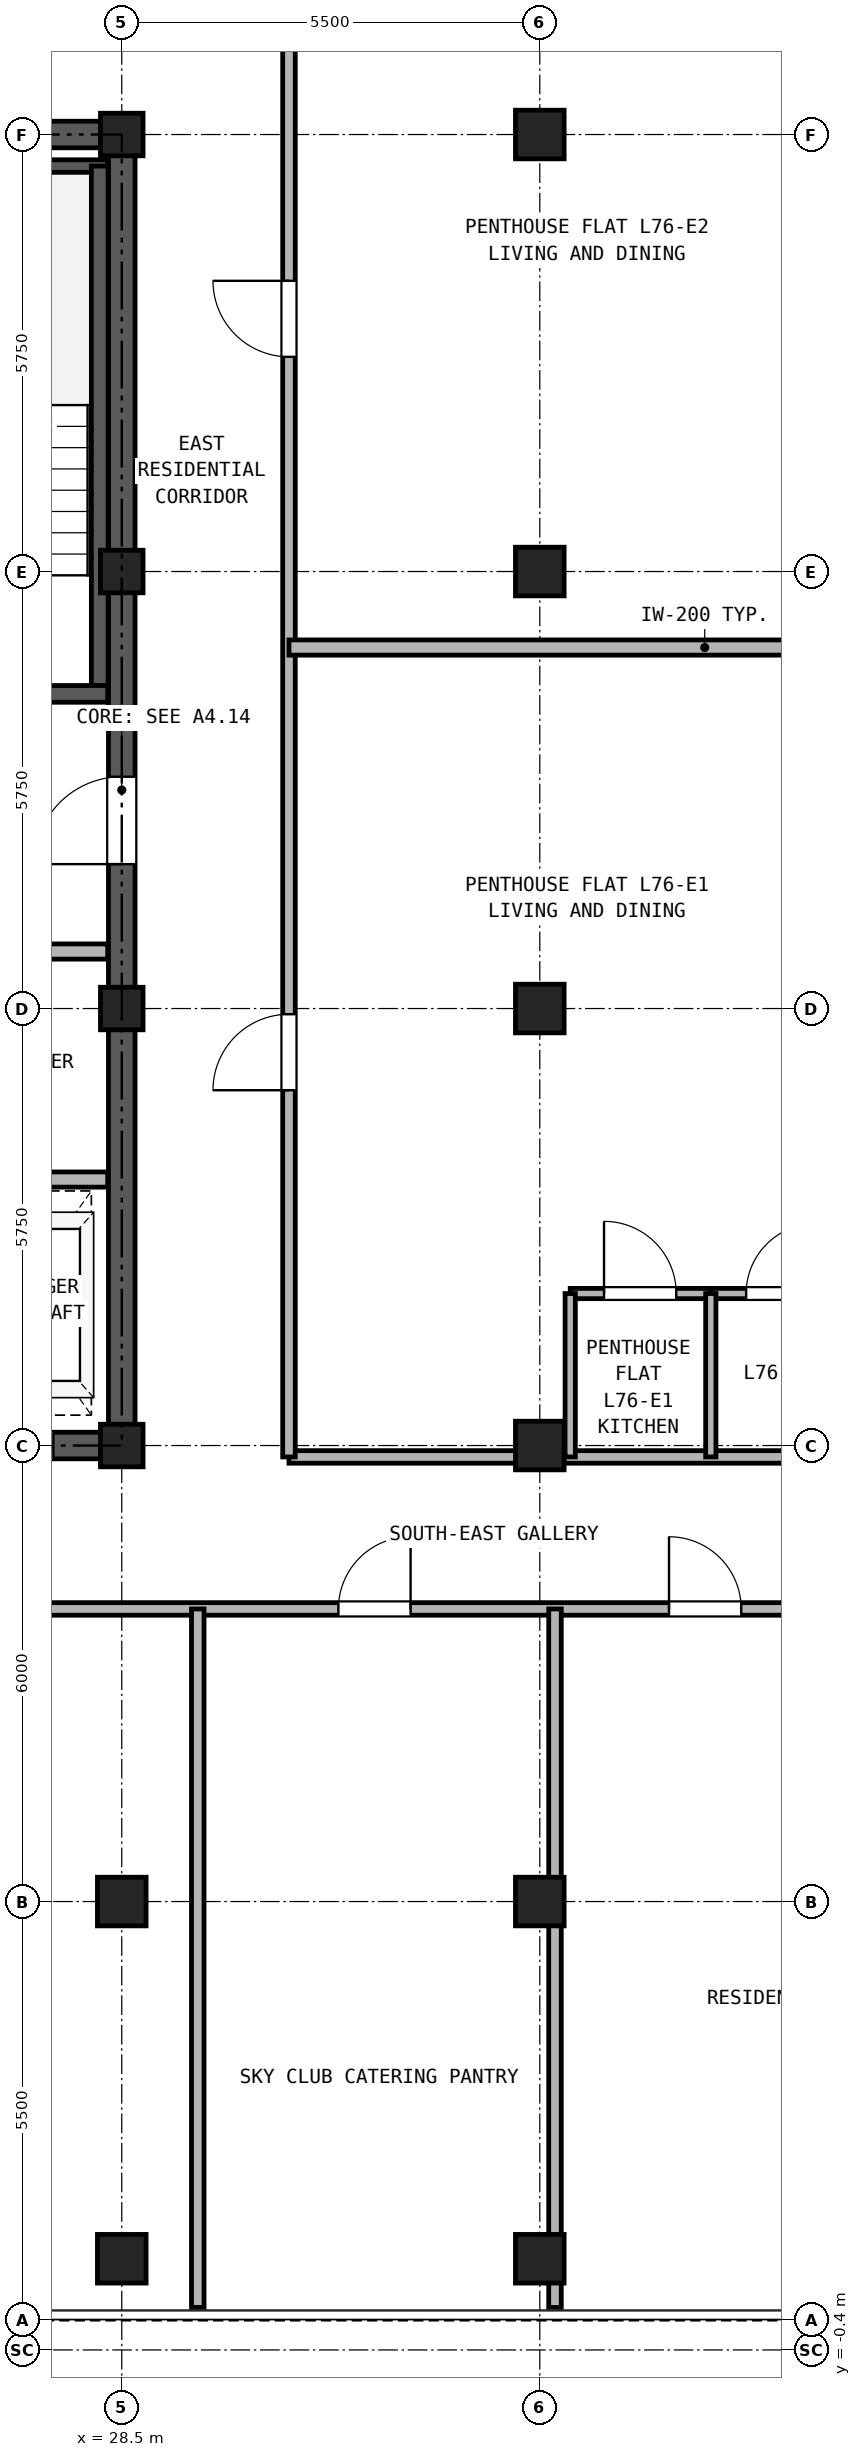
"""IFC4 building model, lengths in metres.
Left out: names, types, materials, properties, quantities, classifications, styles, units other than length and angle.
Written with IfcOpenShell. Run it as: python <this file> out.ifc"""

import sys

from ifc_helpers import new_model, si_unit, direction, frame, frame_2d, origin, origin_2d, place, context, subcontext, project, spatial, rectangle, hollow_rectangle, extrude, source, transform, mapped, element, fill, save


model = new_model("IFC4")
c1 = context("Model", 3, precision=1e-05, world=origin(), true_north=direction((0.0, 1.0)))
c2 = subcontext(c1, "Body", "Model", "MODEL_VIEW")
j1 = project(units=[si_unit("LENGTHUNIT", "METRE"), si_unit("PLANEANGLEUNIT", "RADIAN")], contexts=[c1])
p1 = place(None, origin())
s1 = spatial("IfcSite", under=j1, at=p1, CompositionType="ELEMENT")
p2 = place(p1, origin())
s2 = spatial("IfcBuilding", under=s1, at=p2, CompositionType="ELEMENT")
p3 = place(p2, frame((0.0, 0.0, 264.9)))
s3 = spatial("IfcBuildingStorey", under=s2, at=p3, CompositionType="ELEMENT", Elevation=264.9)
m1 = source(origin(), c2, "Body", "SweptSolid", [
    extrude(hollow_rectangle(XDim=0.64, YDim=0.64, WallThickness=0.035, at=origin_2d()), origin(), (0.0, 0.0, 1.0), 2.98),
])
for number, where, z_axis, x_axis in (
    (1, (28.5, 0.8, 0.0), (0.0, 0.0, 1.0), (1.0, 0.0, 0.0)),
    (2, (34.0, 0.8, 0.0), (0.0, 0.0, 1.0), (1.0, 0.0, 0.0)),
    (3, (28.5, 5.5, 0.0), (0.0, 0.0, 1.0), (1.0, 0.0, 0.0)),
):
    element("IfcColumn", number, at=place(p3, frame(where, z_axis=z_axis, x_axis=x_axis)), inside=s3, PredefinedType="COLUMN", context=c2, shape_type="MappedRepresentation", body=[
        mapped(m1, transform((0.0, 0.0, 0.0), x_axis=(1.0, 0.0, 0.0), y_axis=(0.0, 1.0, 0.0), z_axis=(0.0, 0.0, 1.0), scale=1.0)),
    ])
m2 = source(origin(), c2, "Body", "SweptSolid", [
    extrude(hollow_rectangle(XDim=0.56, YDim=0.56, WallThickness=0.03, at=origin_2d()), origin(), (0.0, 0.0, 1.0), 2.98),
])
for number, where, z_axis, x_axis in (
    (4, (28.5, 11.5, 0.0), (0.0, 0.0, 1.0), (1.0, 0.0, 0.0)),
    (5, (28.5, 17.25, 0.0), (0.0, 0.0, 1.0), (1.0, 0.0, 0.0)),
    (6, (28.5, 23.0, 0.0), (0.0, 0.0, 1.0), (1.0, 0.0, 0.0)),
    (7, (28.5, 28.75, 0.0), (0.0, 0.0, 1.0), (1.0, 0.0, 0.0)),
):
    element("IfcColumn", number, at=place(p3, frame(where, z_axis=z_axis, x_axis=x_axis)), inside=s3, PredefinedType="COLUMN", context=c2, shape_type="MappedRepresentation", body=[
        mapped(m2, transform((0.0, 0.0, 0.0), x_axis=(1.0, 0.0, 0.0), y_axis=(0.0, 1.0, 0.0), z_axis=(0.0, 0.0, 1.0), scale=1.0)),
    ])
for number, where, z_axis, x_axis in (
    (8, (34.0, 5.5, 0.0), (0.0, 0.0, 1.0), (1.0, 0.0, 0.0)),
    (9, (34.0, 11.5, 0.0), (0.0, 0.0, 1.0), (1.0, 0.0, 0.0)),
    (10, (34.0, 17.25, 0.0), (0.0, 0.0, 1.0), (1.0, 0.0, 0.0)),
    (11, (34.0, 23.0, 0.0), (0.0, 0.0, 1.0), (1.0, 0.0, 0.0)),
    (12, (34.0, 28.75, 0.0), (0.0, 0.0, 1.0), (1.0, 0.0, 0.0)),
):
    element("IfcColumn", number, at=place(p3, frame(where, z_axis=z_axis, x_axis=x_axis)), inside=s3, PredefinedType="COLUMN", context=c2, shape_type="MappedRepresentation", body=[
        mapped(m1, transform((0.0, 0.0, 0.0), x_axis=(1.0, 0.0, 0.0), y_axis=(0.0, 1.0, 0.0), z_axis=(0.0, 0.0, 1.0), scale=1.0)),
    ])
p4 = place(p3, frame((18.325, 11.5, 0.0), z_axis=(0.0, 0.0, 1.0), x_axis=(1.0, 0.0, 0.0)))
e13 = element("IfcWall", 13, at=p4, inside=s3, PredefinedType="SHEAR", context=c2, shape_type="SweptSolid", body=[
    extrude(rectangle(XDim=10.35, YDim=0.35, at=frame_2d((5.175, 0.0))), origin(), (0.0, 0.0, 1.0), 2.98),
])
p5 = place(p4, frame((1.775, 0.0, 0.0)))
e14 = element("IfcOpeningElement", 14, at=p5, cuts=e13, PredefinedType="OPENING", context=c2, shape_type="SweptSolid", body=[
    extrude(rectangle(XDim=0.95, YDim=2.15, at=frame_2d((0.475, 1.075))), frame((0.0, 0.185, 0.0), z_axis=(0.0, -1.0, 0.0), x_axis=(1.0, 0.0, 0.0)), (0.0, 0.0, 1.0), 0.37),
])
p6 = place(p4, frame((5.275, 0.0, 0.0)))
e15 = element("IfcOpeningElement", 15, at=p6, cuts=e13, PredefinedType="OPENING", context=c2, shape_type="SweptSolid", body=[
    extrude(rectangle(XDim=0.95, YDim=2.15, at=frame_2d((0.475, 1.075))), frame((0.0, 0.185, 0.0), z_axis=(0.0, -1.0, 0.0), x_axis=(1.0, 0.0, 0.0)), (0.0, 0.0, 1.0), 0.37),
])
p7 = place(p4, frame((8.175, 0.0, 0.0)))
e16 = element("IfcOpeningElement", 16, at=p7, cuts=e13, PredefinedType="OPENING", context=c2, shape_type="SweptSolid", body=[
    extrude(rectangle(XDim=1.1, YDim=2.25, at=frame_2d((0.55, 1.125))), frame((0.0, 0.185, 0.0), z_axis=(0.0, -1.0, 0.0), x_axis=(1.0, 0.0, 0.0)), (0.0, 0.0, 1.0), 0.37),
])
p8 = place(p3, frame((18.325, 28.75, 0.0), z_axis=(0.0, 0.0, 1.0), x_axis=(1.0, 0.0, 0.0)))
e17 = element("IfcWall", 17, at=p8, inside=s3, PredefinedType="SHEAR", context=c2, shape_type="SweptSolid", body=[
    extrude(rectangle(XDim=10.35, YDim=0.35, at=frame_2d((5.175, 0.0))), origin(), (0.0, 0.0, 1.0), 2.98),
])
p9 = place(p8, frame((4.055, 0.0, 0.0)))
e18 = element("IfcOpeningElement", 18, at=p9, cuts=e17, PredefinedType="OPENING", context=c2, shape_type="SweptSolid", body=[
    extrude(rectangle(XDim=0.9, YDim=2.05, at=frame_2d((0.45, 1.025))), frame((0.0, 0.185, 0.0), z_axis=(0.0, -1.0, 0.0), x_axis=(1.0, 0.0, 0.0)), (0.0, 0.0, 1.0), 0.37),
])
p10 = place(p8, frame((5.595, 0.0, 0.0)))
e19 = element("IfcOpeningElement", 19, at=p10, cuts=e17, PredefinedType="OPENING", context=c2, shape_type="SweptSolid", body=[
    extrude(rectangle(XDim=0.9, YDim=2.05, at=frame_2d((0.45, 1.025))), frame((0.0, 0.185, 0.0), z_axis=(0.0, -1.0, 0.0), x_axis=(1.0, 0.0, 0.0)), (0.0, 0.0, 1.0), 0.37),
])
p11 = place(p3, frame((28.5, 11.675, 0.0), z_axis=(0.0, 0.0, 1.0), x_axis=(0.0, 1.0, 0.0)))
e20 = element("IfcWall", 20, at=p11, inside=s3, PredefinedType="SHEAR", context=c2, shape_type="SweptSolid", body=[
    extrude(rectangle(XDim=16.9, YDim=0.35, at=frame_2d((8.45, 0.0))), origin(), (0.0, 0.0, 1.0), 2.98),
])
p12 = place(p11, frame((7.475, 0.0, 0.0)))
e21 = element("IfcOpeningElement", 21, at=p12, cuts=e20, PredefinedType="OPENING", context=c2, shape_type="SweptSolid", body=[
    extrude(rectangle(XDim=1.15, YDim=2.2, at=frame_2d((0.575, 1.1))), frame((0.0, 0.185, 0.0), z_axis=(0.0, -1.0, 0.0), x_axis=(1.0, 0.0, 0.0)), (0.0, 0.0, 1.0), 0.37),
])
p13 = place(p3, frame((25.13, 28.335, 0.0), z_axis=(0.0, 0.0, 1.0), x_axis=(1.0, 0.0, 0.0)))
e22 = element("IfcWall", 22, at=p13, inside=s3, PredefinedType="PARTITIONING", context=c2, shape_type="SweptSolid", body=[
    extrude(rectangle(XDim=3.185, YDim=0.165, at=frame_2d((1.593, 0.0))), origin(), (0.0, 0.0, 1.0), 2.98),
])
p14 = place(p3, frame((28.21, 21.39, 0.0), z_axis=(0.0, 0.0, 1.0), x_axis=(0.0, 1.0, 0.0)))
e23 = element("IfcWall", 23, at=p14, inside=s3, PredefinedType="SOLIDWALL", context=c2, shape_type="SweptSolid", body=[
    extrude(rectangle(XDim=6.945, YDim=0.22, at=frame_2d((3.473, 0.0))), origin(), (0.0, 0.0, 1.0), 2.98),
])
p15 = place(p3, frame((25.13, 21.39, 0.0), z_axis=(0.0, 0.0, 1.0), x_axis=(1.0, 0.0, 0.0)))
e24 = element("IfcWall", 24, at=p15, inside=s3, PredefinedType="SOLIDWALL", context=c2, shape_type="SweptSolid", body=[
    extrude(rectangle(XDim=3.185, YDim=0.22, at=frame_2d((1.593, 0.0))), origin(), (0.0, 0.0, 1.0), 2.98),
])
p16 = place(p15, frame((0.92, 0.0, 0.0)))
e25 = element("IfcOpeningElement", 25, at=p16, cuts=e24, PredefinedType="OPENING", context=c2, shape_type="SweptSolid", body=[
    extrude(rectangle(XDim=1.15, YDim=2.2, at=frame_2d((0.575, 1.1))), frame((0.0, 0.12, 0.0), z_axis=(0.0, -1.0, 0.0), x_axis=(1.0, 0.0, 0.0)), (0.0, 0.0, 1.0), 0.24),
])
p17 = place(p3, frame((18.685, 18.0, 0.0), z_axis=(0.0, 0.0, 1.0), x_axis=(1.0, 0.0, 0.0)))
e26 = element("IfcWall", 26, at=p17, inside=s3, PredefinedType="PARTITIONING", context=c2, shape_type="SweptSolid", body=[
    extrude(rectangle(XDim=9.63, YDim=0.2, at=frame_2d((4.815, 0.0))), origin(), (0.0, 0.0, 1.0), 2.98),
])
p18 = place(p17, frame((0.565, 0.0, 0.0)))
e27 = element("IfcOpeningElement", 27, at=p18, cuts=e26, PredefinedType="OPENING", context=c2, shape_type="SweptSolid", body=[
    extrude(rectangle(XDim=1.3, YDim=2.3, at=frame_2d((0.65, 1.15))), frame((0.0, 0.11, 0.0), z_axis=(0.0, -1.0, 0.0), x_axis=(1.0, 0.0, 0.0)), (0.0, 0.0, 1.0), 0.22),
])
p19 = place(p17, frame((2.665, 0.0, 0.0)))
e28 = element("IfcOpeningElement", 28, at=p19, cuts=e26, PredefinedType="OPENING", context=c2, shape_type="SweptSolid", body=[
    extrude(rectangle(XDim=1.3, YDim=2.3, at=frame_2d((0.65, 1.15))), frame((0.0, 0.11, 0.0), z_axis=(0.0, -1.0, 0.0), x_axis=(1.0, 0.0, 0.0)), (0.0, 0.0, 1.0), 0.22),
])
p20 = place(p17, frame((5.065, 0.0, 0.0)))
e29 = element("IfcOpeningElement", 29, at=p20, cuts=e26, PredefinedType="OPENING", context=c2, shape_type="SweptSolid", body=[
    extrude(rectangle(XDim=0.9, YDim=2.05, at=frame_2d((0.45, 1.025))), frame((0.0, 0.11, 0.0), z_axis=(0.0, -1.0, 0.0), x_axis=(1.0, 0.0, 0.0)), (0.0, 0.0, 1.0), 0.22),
])
p21 = place(p17, frame((7.765, 0.0, 0.0)))
e30 = element("IfcOpeningElement", 30, at=p21, cuts=e26, PredefinedType="OPENING", context=c2, shape_type="SweptSolid", body=[
    extrude(rectangle(XDim=0.9, YDim=2.05, at=frame_2d((0.45, 1.025))), frame((0.0, 0.11, 0.0), z_axis=(0.0, -1.0, 0.0), x_axis=(1.0, 0.0, 0.0)), (0.0, 0.0, 1.0), 0.22),
])
p22 = place(p3, frame((18.685, 15.0, 0.0), z_axis=(0.0, 0.0, 1.0), x_axis=(1.0, 0.0, 0.0)))
e31 = element("IfcWall", 31, at=p22, inside=s3, PredefinedType="PARTITIONING", context=c2, shape_type="SweptSolid", body=[
    extrude(rectangle(XDim=9.63, YDim=0.2, at=frame_2d((4.815, 0.0))), origin(), (0.0, 0.0, 1.0), 2.98),
])
p23 = place(p3, frame((5.36, 9.35, 0.0), z_axis=(0.0, 0.0, 1.0), x_axis=(1.0, 0.0, 0.0)))
e32 = element("IfcWall", 32, at=p23, inside=s3, PredefinedType="PARTITIONING", context=c2, shape_type="SweptSolid", body=[
    extrude(rectangle(XDim=36.28, YDim=0.165, at=frame_2d((18.14, 0.0))), origin(), (0.0, 0.0, 1.0), 2.98),
])
p24 = place(p23, frame((8.92, 0.0, 0.0)))
e33 = element("IfcOpeningElement", 33, at=p24, cuts=e32, PredefinedType="OPENING", context=c2, shape_type="SweptSolid", body=[
    extrude(rectangle(XDim=0.95, YDim=2.15, at=frame_2d((0.475, 1.075))), frame((0.0, 0.093, 0.0), z_axis=(0.0, -1.0, 0.0), x_axis=(1.0, 0.0, 0.0)), (0.0, 0.0, 1.0), 0.185),
])
p25 = place(p23, frame((19.39, 0.0, 0.0)))
e34 = element("IfcOpeningElement", 34, at=p25, cuts=e32, PredefinedType="OPENING", context=c2, shape_type="SweptSolid", body=[
    extrude(rectangle(XDim=0.95, YDim=2.15, at=frame_2d((0.475, 1.075))), frame((0.0, 0.093, 0.0), z_axis=(0.0, -1.0, 0.0), x_axis=(1.0, 0.0, 0.0)), (0.0, 0.0, 1.0), 0.185),
])
p26 = place(p23, frame((25.99, 0.0, 0.0)))
e35 = element("IfcOpeningElement", 35, at=p26, cuts=e32, PredefinedType="OPENING", context=c2, shape_type="SweptSolid", body=[
    extrude(rectangle(XDim=0.95, YDim=2.15, at=frame_2d((0.475, 1.075))), frame((0.0, 0.093, 0.0), z_axis=(0.0, -1.0, 0.0), x_axis=(1.0, 0.0, 0.0)), (0.0, 0.0, 1.0), 0.185),
])
p27 = place(p23, frame((30.34, 0.0, 0.0)))
e36 = element("IfcOpeningElement", 36, at=p27, cuts=e32, PredefinedType="OPENING", context=c2, shape_type="SweptSolid", body=[
    extrude(rectangle(XDim=0.95, YDim=2.15, at=frame_2d((0.475, 1.075))), frame((0.0, 0.093, 0.0), z_axis=(0.0, -1.0, 0.0), x_axis=(1.0, 0.0, 0.0)), (0.0, 0.0, 1.0), 0.185),
])
p28 = place(p3, frame((30.7, 11.35, 0.0), z_axis=(0.0, 0.0, 1.0), x_axis=(1.0, 0.0, 0.0)))
e37 = element("IfcWall", 37, at=p28, inside=s3, PredefinedType="PARTITIONING", context=c2, shape_type="SweptSolid", body=[
    extrude(rectangle(XDim=7.5, YDim=0.165, at=frame_2d((3.75, 0.0))), origin(), (0.0, 0.0, 1.0), 2.428),
])
p29 = place(p3, frame((30.7, 11.35, 0.0), z_axis=(0.0, 0.0, 1.0), x_axis=(0.0, 1.0, 0.0)))
e38 = element("IfcWall", 38, at=p29, inside=s3, PredefinedType="PARTITIONING", context=c2, shape_type="SweptSolid", body=[
    extrude(rectangle(XDim=23.79, YDim=0.165, at=frame_2d((11.895, 0.0))), origin(), (0.0, 0.0, 1.0), 2.98),
])
p30 = place(p29, frame((4.825, 0.0, 0.0)))
e39 = element("IfcOpeningElement", 39, at=p30, cuts=e38, PredefinedType="OPENING", context=c2, shape_type="SweptSolid", body=[
    extrude(rectangle(XDim=1.0, YDim=2.15, at=frame_2d((0.5, 1.075))), frame((0.0, 0.093, 0.0), z_axis=(0.0, -1.0, 0.0), x_axis=(1.0, 0.0, 0.0)), (0.0, 0.0, 1.0), 0.185),
])
p31 = place(p29, frame((14.475, 0.0, 0.0)))
e40 = element("IfcOpeningElement", 40, at=p31, cuts=e38, PredefinedType="OPENING", context=c2, shape_type="SweptSolid", body=[
    extrude(rectangle(XDim=1.0, YDim=2.15, at=frame_2d((0.5, 1.075))), frame((0.0, 0.093, 0.0), z_axis=(0.0, -1.0, 0.0), x_axis=(1.0, 0.0, 0.0)), (0.0, 0.0, 1.0), 0.185),
])
p32 = place(p3, frame((29.5, 0.16, 0.0), z_axis=(0.0, 0.0, 1.0), x_axis=(0.0, 1.0, 0.0)))
e41 = element("IfcWall", 41, at=p32, inside=s3, PredefinedType="PARTITIONING", context=c2, shape_type="SweptSolid", body=[
    extrude(rectangle(XDim=9.19, YDim=0.165, at=frame_2d((4.595, 0.0))), origin(), (0.0, 0.0, 1.0), 2.98),
])
p33 = place(p3, frame((34.2, 0.16, 0.0), z_axis=(0.0, 0.0, 1.0), x_axis=(0.0, 1.0, 0.0)))
e42 = element("IfcWall", 42, at=p33, inside=s3, PredefinedType="PARTITIONING", context=c2, shape_type="SweptSolid", body=[
    extrude(rectangle(XDim=9.19, YDim=0.165, at=frame_2d((4.595, 0.0))), origin(), (0.0, 0.0, 1.0), 2.428),
])
p34 = place(p3, frame((34.4, 13.5, 0.0), z_axis=(0.0, 0.0, 1.0), x_axis=(1.0, 0.0, 0.0)))
e43 = element("IfcWall", 43, at=p34, inside=s3, PredefinedType="PARTITIONING", context=c2, shape_type="SweptSolid", body=[
    extrude(rectangle(XDim=1.85, YDim=0.135, at=frame_2d((0.925, 0.0))), origin(), (0.0, 0.0, 1.0), 2.98),
])
p35 = place(p34, frame((0.445, 0.0, 0.0)))
e44 = element("IfcOpeningElement", 44, at=p35, cuts=e43, PredefinedType="OPENING", context=c2, shape_type="SweptSolid", body=[
    extrude(rectangle(XDim=0.95, YDim=2.15, at=frame_2d((0.475, 1.075))), frame((0.0, 0.077, 0.0), z_axis=(0.0, -1.0, 0.0), x_axis=(1.0, 0.0, 0.0)), (0.0, 0.0, 1.0), 0.155),
])
p36 = place(p3, frame((36.25, 13.5, 0.0), z_axis=(0.0, 0.0, 1.0), x_axis=(1.0, 0.0, 0.0)))
e45 = element("IfcWall", 45, at=p36, inside=s3, PredefinedType="PARTITIONING", context=c2, shape_type="SweptSolid", body=[
    extrude(rectangle(XDim=1.85, YDim=0.135, at=frame_2d((0.925, 0.0))), origin(), (0.0, 0.0, 1.0), 2.98),
])
p37 = place(p36, frame((0.465, 0.0, 0.0)))
e46 = element("IfcOpeningElement", 46, at=p37, cuts=e45, PredefinedType="OPENING", context=c2, shape_type="SweptSolid", body=[
    extrude(rectangle(XDim=0.92, YDim=2.1, at=frame_2d((0.46, 1.05))), frame((0.0, 0.077, 0.0), z_axis=(0.0, -1.0, 0.0), x_axis=(1.0, 0.0, 0.0)), (0.0, 0.0, 1.0), 0.155),
])
for number, where, z_axis, x_axis in (
    (47, (34.4, 11.35, 0.0), (0.0, 0.0, 1.0), (0.0, 1.0, 0.0)),
    (48, (36.25, 11.35, 0.0), (0.0, 0.0, 1.0), (0.0, 1.0, 0.0)),
):
    element("IfcWall", number, at=place(p3, frame(where, z_axis=z_axis, x_axis=x_axis)), inside=s3, PredefinedType="PARTITIONING", context=c2, shape_type="SweptSolid", body=[
        extrude(rectangle(XDim=2.15, YDim=0.135, at=frame_2d((1.075, 0.0))), origin(), (0.0, 0.0, 1.0), 2.98),
    ])
p38 = place(p3, frame((30.7, 22.0, 0.0), z_axis=(0.0, 0.0, 1.0), x_axis=(1.0, 0.0, 0.0)))
e49 = element("IfcWall", 49, at=p38, inside=s3, PredefinedType="PARTITIONING", context=c2, shape_type="SweptSolid", body=[
    extrude(rectangle(XDim=10.94, YDim=0.2, at=frame_2d((5.47, 0.0))), origin(), (0.0, 0.0, 1.0), 2.98),
])
p39 = place(p12, origin())
e50 = element("IfcDoor", 50, at=p39, inside=s3, OperationType="SINGLE_SWING_LEFT", PredefinedType="DOOR", context=c2, shape_type="SweptSolid", body=[
    extrude(rectangle(XDim=1.15, YDim=2.2, at=frame_2d((0.575, 1.1))), frame((0.0, 0.025, 0.0), z_axis=(0.0, -1.0, 0.0), x_axis=(1.0, 0.0, 0.0)), (0.0, 0.0, 1.0), 0.05),
])
fill(e21, e50)
p40 = place(p7, frame((1.1, 0.0, 0.0), z_axis=(0.0, 0.0, 1.0), x_axis=(-1.0, 0.0, 0.0)))
e51 = element("IfcDoor", 51, at=p40, inside=s3, OperationType="DOUBLE_DOOR_SLIDING", PredefinedType="DOOR", context=c2, shape_type="SweptSolid", body=[
    extrude(rectangle(XDim=1.1, YDim=2.25, at=frame_2d((0.55, 1.125))), frame((0.0, 0.025, 0.0), z_axis=(0.0, -1.0, 0.0), x_axis=(1.0, 0.0, 0.0)), (0.0, 0.0, 1.0), 0.05),
])
fill(e16, e51)
p41 = place(p26, frame((0.95, 0.0, 0.0), z_axis=(0.0, 0.0, 1.0), x_axis=(-1.0, 0.0, 0.0)))
e52 = element("IfcDoor", 52, at=p41, inside=s3, OperationType="SINGLE_SWING_RIGHT", PredefinedType="DOOR", context=c2, shape_type="SweptSolid", body=[
    extrude(rectangle(XDim=0.95, YDim=2.15, at=frame_2d((0.475, 1.075))), frame((0.0, 0.025, 0.0), z_axis=(0.0, -1.0, 0.0), x_axis=(1.0, 0.0, 0.0)), (0.0, 0.0, 1.0), 0.05),
])
fill(e35, e52)
p42 = place(p27, frame((0.95, 0.0, 0.0), z_axis=(0.0, 0.0, 1.0), x_axis=(-1.0, 0.0, 0.0)))
e53 = element("IfcDoor", 53, at=p42, inside=s3, OperationType="SINGLE_SWING_LEFT", PredefinedType="DOOR", context=c2, shape_type="SweptSolid", body=[
    extrude(rectangle(XDim=0.95, YDim=2.15, at=frame_2d((0.475, 1.075))), frame((0.0, 0.025, 0.0), z_axis=(0.0, -1.0, 0.0), x_axis=(1.0, 0.0, 0.0)), (0.0, 0.0, 1.0), 0.05),
])
fill(e36, e53)
p43 = place(p35, origin())
e54 = element("IfcDoor", 54, at=p43, inside=s3, OperationType="SINGLE_SWING_LEFT", PredefinedType="DOOR", context=c2, shape_type="SweptSolid", body=[
    extrude(rectangle(XDim=0.95, YDim=2.15, at=frame_2d((0.475, 1.075))), frame((0.0, 0.025, 0.0), z_axis=(0.0, -1.0, 0.0), x_axis=(1.0, 0.0, 0.0)), (0.0, 0.0, 1.0), 0.05),
])
fill(e44, e54)
p44 = place(p37, origin())
e55 = element("IfcDoor", 55, at=p44, inside=s3, OperationType="SINGLE_SWING_RIGHT", PredefinedType="DOOR", context=c2, shape_type="SweptSolid", body=[
    extrude(rectangle(XDim=0.92, YDim=2.1, at=frame_2d((0.46, 1.05))), frame((0.0, 0.025, 0.0), z_axis=(0.0, -1.0, 0.0), x_axis=(1.0, 0.0, 0.0)), (0.0, 0.0, 1.0), 0.05),
])
fill(e46, e55)
p45 = place(p30, frame((1.0, 0.0, 0.0), z_axis=(0.0, 0.0, 1.0), x_axis=(-1.0, 0.0, 0.0)))
e56 = element("IfcDoor", 56, at=p45, inside=s3, OperationType="SINGLE_SWING_LEFT", PredefinedType="DOOR", context=c2, shape_type="SweptSolid", body=[
    extrude(rectangle(XDim=1.0, YDim=2.15, at=frame_2d((0.5, 1.075))), frame((0.0, 0.025, 0.0), z_axis=(0.0, -1.0, 0.0), x_axis=(1.0, 0.0, 0.0)), (0.0, 0.0, 1.0), 0.05),
])
fill(e39, e56)
p46 = place(p31, frame((1.0, 0.0, 0.0), z_axis=(0.0, 0.0, 1.0), x_axis=(-1.0, 0.0, 0.0)))
e57 = element("IfcDoor", 57, at=p46, inside=s3, OperationType="SINGLE_SWING_RIGHT", PredefinedType="DOOR", context=c2, shape_type="SweptSolid", body=[
    extrude(rectangle(XDim=1.0, YDim=2.15, at=frame_2d((0.5, 1.075))), frame((0.0, 0.025, 0.0), z_axis=(0.0, -1.0, 0.0), x_axis=(1.0, 0.0, 0.0)), (0.0, 0.0, 1.0), 0.05),
])
fill(e40, e57)
save(model, sys.argv[1])
